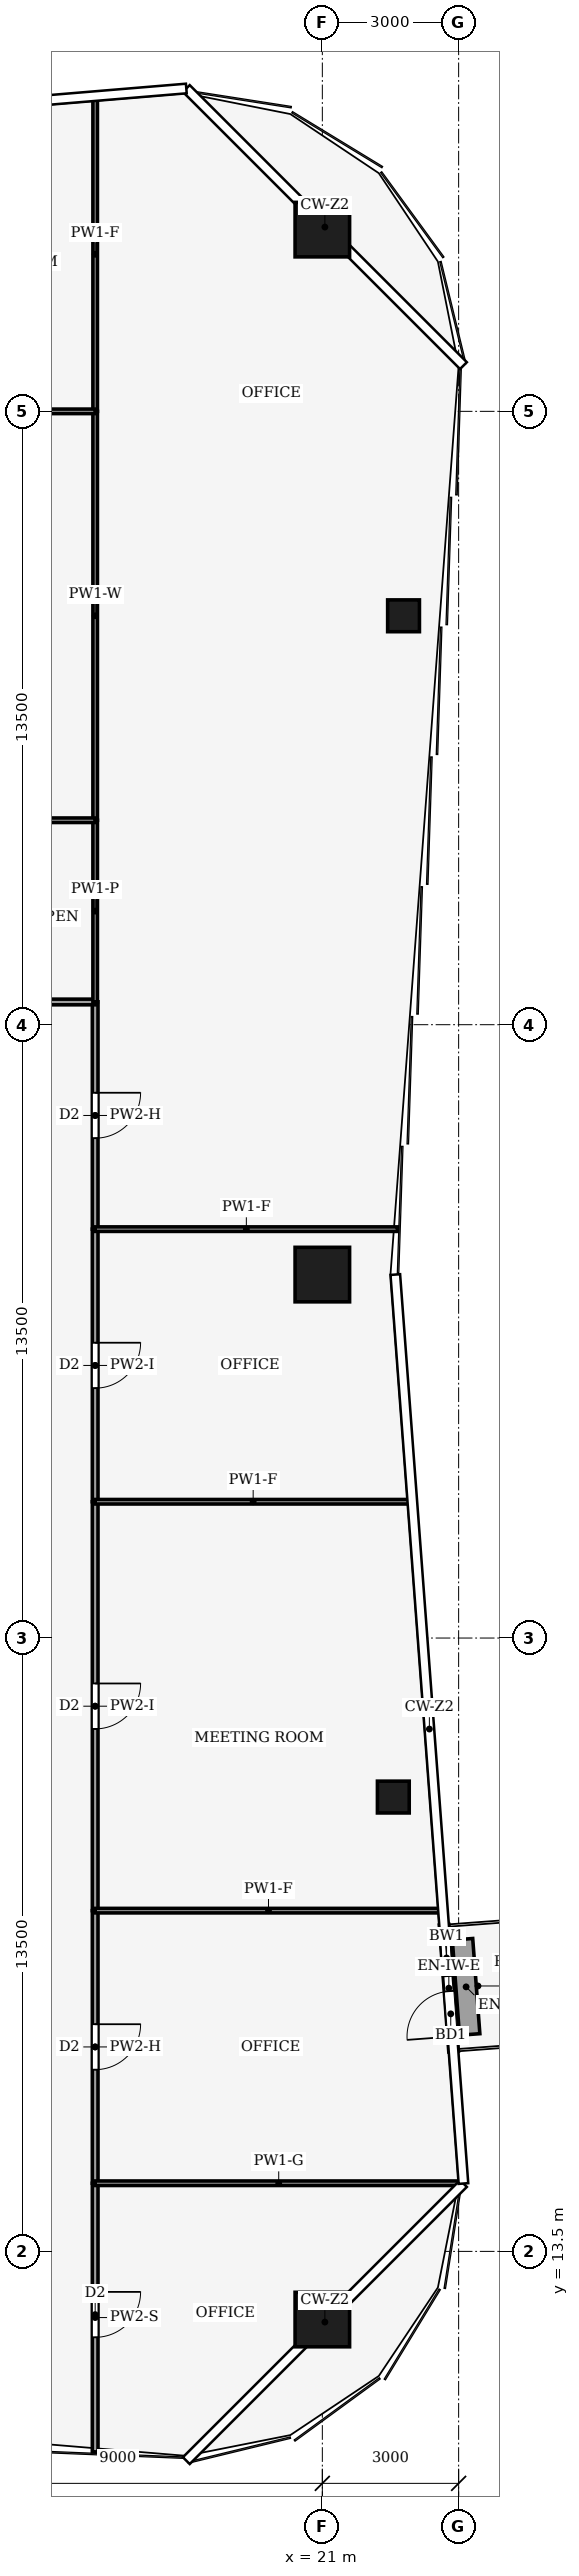
"""IFC4 building model, lengths in metres.
Left out: names, types, materials, properties, quantities, classifications, styles, units other than length and angle.
Written with IfcOpenShell. Run it as: python <this file> out.ifc"""

import sys

from ifc_helpers import new_model, si_unit, direction, frame, frame_2d, origin, origin_2d, place, context, subcontext, project, spatial, rectangle, hollow_rectangle, extrude, element, fill, save


model = new_model("IFC4")
c1 = context("Model", 3, precision=1e-05, world=origin(), true_north=direction((0.0, 1.0)))
c2 = subcontext(c1, "Body", "Model", "MODEL_VIEW")
j1 = project(units=[si_unit("LENGTHUNIT", "METRE"), si_unit("PLANEANGLEUNIT", "RADIAN")], contexts=[c1])
p1 = place(None, origin())
s1 = spatial("IfcSite", under=j1, at=p1, CompositionType="ELEMENT")
p2 = place(p1, origin())
s2 = spatial("IfcBuilding", under=s1, at=p2, CompositionType="ELEMENT")
p3 = place(p2, frame((0.0, 0.0, 130.0)))
s3 = spatial("IfcBuildingStorey", under=s2, at=p3, CompositionType="ELEMENT", Elevation=130.0)
for number, where, z_axis, x_axis in (
    (1, (21.0, 58.0, 0.0), (0.0, 0.0, 1.0), (1.0, 0.0, 0.0)),
    (2, (21.0, 35.0, 0.0), (0.0, 0.0, 1.0), (1.0, 0.0, 0.0)),
    (3, (21.0, 12.0, 0.0), (0.0, 0.0, 1.0), (1.0, 0.0, 0.0)),
):
    element("IfcColumn", number, at=place(p3, frame(where, z_axis=z_axis, x_axis=x_axis)), inside=s3, PredefinedType="COLUMN", context=c2, shape_type="SweptSolid", body=[
        extrude(hollow_rectangle(XDim=1.2, YDim=1.2, WallThickness=0.07, at=origin_2d()), origin(), (0.0, 0.0, 1.0), 4.0),
    ])
for number, where, z_axis, x_axis in (
    (4, (22.562, 23.5, 0.0), (0.0, 0.0, 1.0), (1.0, 0.0, 0.0)),
    (5, (22.788, 49.5, 0.0), (0.0, 0.0, 1.0), (1.0, 0.0, 0.0)),
):
    element("IfcColumn", number, at=place(p3, frame(where, z_axis=z_axis, x_axis=x_axis)), inside=s3, PredefinedType="COLUMN", context=c2, shape_type="SweptSolid", body=[
        extrude(hollow_rectangle(XDim=0.7, YDim=0.7, WallThickness=0.03, at=origin_2d()), origin(), (0.0, 0.0, 1.0), 4.0),
    ])
p4 = place(p3, frame((23.889, 17.897, 0.0), z_axis=(0.0, 0.0, 1.0), x_axis=(-0.07478344779, 0.997199797401, 0.0)))
e6 = element("IfcWall", 6, at=p4, inside=s3, PredefinedType="SOLIDWALL", context=c2, shape_type="SweptSolid", body=[
    extrude(rectangle(XDim=2.801, YDim=0.212, at=frame_2d((1.4, 0.0))), origin(), (0.0, 0.0, 1.0), 3.65),
])
p5 = place(p4, frame((0.334, 0.0, 0.0)))
e7 = element("IfcOpeningElement", 7, at=p5, cuts=e6, PredefinedType="OPENING", context=c2, shape_type="SweptSolid", body=[
    extrude(rectangle(XDim=1.0, YDim=2.1, at=frame_2d((0.5, 1.05))), frame((0.0, 0.116, 0.0), z_axis=(0.0, -1.0, 0.0), x_axis=(1.0, 0.0, 0.0)), (0.0, 0.0, 1.0), 0.232),
])
p6 = place(p4, frame((1.667, 0.0, 0.9)))
e8 = element("IfcOpeningElement", 8, at=p6, cuts=e6, PredefinedType="OPENING", context=c2, shape_type="SweptSolid", body=[
    extrude(rectangle(XDim=0.8, YDim=1.2, at=frame_2d((0.4, 0.6))), frame((0.0, 0.116, 0.0), z_axis=(0.0, -1.0, 0.0), x_axis=(1.0, 0.0, 0.0)), (0.0, 0.0, 1.0), 0.232),
])
p7 = place(p3, frame((24.243, 18.274, 0.0), z_axis=(0.0, 0.0, 1.0), x_axis=(-0.074706185882, 0.997205588528, 0.0)))
e9 = element("IfcWall", 9, at=p7, inside=s3, PredefinedType="USERDEFINED", context=c2, shape_type="SweptSolid", body=[
    extrude(rectangle(XDim=2.101, YDim=0.45, at=frame_2d((1.051, 0.0))), origin(), (0.0, 0.0, 1.0), 0.4),
])
p8 = place(p3, frame((16.0, 15.0, 0.0), z_axis=(0.0, 0.0, 1.0), x_axis=(0.0, -1.0, 0.0)))
e10 = element("IfcWall", 10, at=p8, inside=s3, PredefinedType="PARTITIONING", context=c2, shape_type="SweptSolid", body=[
    extrude(rectangle(XDim=5.913, YDim=0.125, at=frame_2d((2.957, 0.0))), origin(), (0.0, 0.0, 1.0), 3.04),
])
p9 = place(p8, frame((2.392, 0.0, 0.0)))
e11 = element("IfcOpeningElement", 11, at=p9, cuts=e10, PredefinedType="OPENING", context=c2, shape_type="SweptSolid", body=[
    extrude(rectangle(XDim=1.0, YDim=2.1, at=frame_2d((0.5, 1.05))), frame((0.0, 0.073, 0.0), z_axis=(0.0, -1.0, 0.0), x_axis=(1.0, 0.0, 0.0)), (0.0, 0.0, 1.0), 0.145),
])
p10 = place(p3, frame((16.0, 21.0, 0.0), z_axis=(0.0, 0.0, 1.0), x_axis=(0.0, -1.0, 0.0)))
e12 = element("IfcWall", 12, at=p10, inside=s3, PredefinedType="PARTITIONING", context=c2, shape_type="SweptSolid", body=[
    extrude(rectangle(XDim=6.0, YDim=0.125, at=frame_2d((3.0, 0.0))), origin(), (0.0, 0.0, 1.0), 3.14),
])
p11 = place(p10, frame((2.5, 0.0, 0.0)))
e13 = element("IfcOpeningElement", 13, at=p11, cuts=e12, PredefinedType="OPENING", context=c2, shape_type="SweptSolid", body=[
    extrude(rectangle(XDim=1.0, YDim=2.1, at=frame_2d((0.5, 1.05))), frame((0.0, 0.073, 0.0), z_axis=(0.0, -1.0, 0.0), x_axis=(1.0, 0.0, 0.0)), (0.0, 0.0, 1.0), 0.145),
])
p12 = place(p3, frame((16.0, 30.0, 0.0), z_axis=(0.0, 0.0, 1.0), x_axis=(0.0, -1.0, 0.0)))
e14 = element("IfcWall", 14, at=p12, inside=s3, PredefinedType="PARTITIONING", context=c2, shape_type="SweptSolid", body=[
    extrude(rectangle(XDim=9.0, YDim=0.125, at=frame_2d((4.5, 0.0))), origin(), (0.0, 0.0, 1.0), 3.48),
])
p13 = place(p12, frame((4.0, 0.0, 0.0)))
e15 = element("IfcOpeningElement", 15, at=p13, cuts=e14, PredefinedType="OPENING", context=c2, shape_type="SweptSolid", body=[
    extrude(rectangle(XDim=1.0, YDim=2.1, at=frame_2d((0.5, 1.05))), frame((0.0, 0.073, 0.0), z_axis=(0.0, -1.0, 0.0), x_axis=(1.0, 0.0, 0.0)), (0.0, 0.0, 1.0), 0.145),
])
p14 = place(p3, frame((16.0, 36.0, 0.0), z_axis=(0.0, 0.0, 1.0), x_axis=(0.0, -1.0, 0.0)))
e16 = element("IfcWall", 16, at=p14, inside=s3, PredefinedType="PARTITIONING", context=c2, shape_type="SweptSolid", body=[
    extrude(rectangle(XDim=6.0, YDim=0.125, at=frame_2d((3.0, 0.0))), origin(), (0.0, 0.0, 1.0), 3.48),
])
p15 = place(p14, frame((2.5, 0.0, 0.0)))
e17 = element("IfcOpeningElement", 17, at=p15, cuts=e16, PredefinedType="OPENING", context=c2, shape_type="SweptSolid", body=[
    extrude(rectangle(XDim=1.0, YDim=2.1, at=frame_2d((0.5, 1.05))), frame((0.0, 0.073, 0.0), z_axis=(0.0, -1.0, 0.0), x_axis=(1.0, 0.0, 0.0)), (0.0, 0.0, 1.0), 0.145),
])
p16 = place(p3, frame((16.0, 41.004, 0.0), z_axis=(0.0, 0.0, 1.0), x_axis=(0.0, -1.0, 0.0)))
e18 = element("IfcWall", 18, at=p16, inside=s3, PredefinedType="PARTITIONING", context=c2, shape_type="SweptSolid", body=[
    extrude(rectangle(XDim=5.004, YDim=0.125, at=frame_2d((2.502, 0.0))), origin(), (0.0, 0.0, 1.0), 3.14),
])
p17 = place(p16, frame((2.002, 0.0, 0.0)))
e19 = element("IfcOpeningElement", 19, at=p17, cuts=e18, PredefinedType="OPENING", context=c2, shape_type="SweptSolid", body=[
    extrude(rectangle(XDim=1.0, YDim=2.1, at=frame_2d((0.5, 1.05))), frame((0.0, 0.073, 0.0), z_axis=(0.0, -1.0, 0.0), x_axis=(1.0, 0.0, 0.0)), (0.0, 0.0, 1.0), 0.145),
])
p18 = place(p3, frame((12.0, 41.0, 0.0), z_axis=(0.0, 0.0, 1.0), x_axis=(1.0, 0.0, 0.0)))
e20 = element("IfcWall", 20, at=p18, inside=s3, PredefinedType="PARTITIONING", context=c2, shape_type="SweptSolid", body=[
    extrude(rectangle(XDim=4.0, YDim=0.125, at=frame_2d((2.0, 0.0))), origin(), (0.0, 0.0, 1.0), 3.44),
])
p19 = place(p18, frame((1.5, 0.0, 0.0)))
e21 = element("IfcOpeningElement", 21, at=p19, cuts=e20, PredefinedType="OPENING", context=c2, shape_type="SweptSolid", body=[
    extrude(rectangle(XDim=1.0, YDim=2.1, at=frame_2d((0.5, 1.05))), frame((0.0, 0.073, 0.0), z_axis=(0.0, -1.0, 0.0), x_axis=(1.0, 0.0, 0.0)), (0.0, 0.0, 1.0), 0.145),
])
p20 = place(p3, frame((24.08, 15.0, 0.0), z_axis=(0.0, 0.0, 1.0), x_axis=(-1.0, 0.0, 0.0)))
e22 = element("IfcWall", 22, at=p20, inside=s3, PredefinedType="PARTITIONING", context=c2, shape_type="SweptSolid", body=[
    extrude(rectangle(XDim=8.08, YDim=0.1, at=frame_2d((4.04, 0.0))), origin(), (0.0, 0.0, 1.0), 2.93),
])
p21 = place(p3, frame((23.63, 21.0, 0.0), z_axis=(0.0, 0.0, 1.0), x_axis=(-1.0, 0.0, 0.0)))
e23 = element("IfcWall", 23, at=p21, inside=s3, PredefinedType="PARTITIONING", context=c2, shape_type="SweptSolid", body=[
    extrude(rectangle(XDim=7.63, YDim=0.1, at=frame_2d((3.815, 0.0))), origin(), (0.0, 0.0, 1.0), 3.04),
])
p22 = place(p3, frame((22.955, 30.0, 0.0), z_axis=(0.0, 0.0, 1.0), x_axis=(-1.0, 0.0, 0.0)))
e24 = element("IfcWall", 24, at=p22, inside=s3, PredefinedType="PARTITIONING", context=c2, shape_type="SweptSolid", body=[
    extrude(rectangle(XDim=6.955, YDim=0.1, at=frame_2d((3.478, 0.0))), origin(), (0.0, 0.0, 1.0), 3.04),
])
p23 = place(p3, frame((22.655, 36.0, 0.0), z_axis=(0.0, 0.0, 1.0), x_axis=(-1.0, 0.0, 0.0)))
e25 = element("IfcWall", 25, at=p23, inside=s3, PredefinedType="PARTITIONING", context=c2, shape_type="SweptSolid", body=[
    extrude(rectangle(XDim=6.655, YDim=0.1, at=frame_2d((3.328, 0.0))), origin(), (0.0, 0.0, 1.0), 3.04),
])
p24 = place(p3, frame((16.0, 45.0, 0.0), z_axis=(0.0, 0.0, 1.0), x_axis=(0.0, -1.0, 0.0)))
e26 = element("IfcWall", 26, at=p24, inside=s3, PredefinedType="PARTITIONING", context=c2, shape_type="SweptSolid", body=[
    extrude(rectangle(XDim=4.0, YDim=0.1, at=frame_2d((2.0, 0.0))), origin(), (0.0, 0.0, 1.0), 3.44),
])
p25 = place(p3, frame((16.0, 54.0, 0.0), z_axis=(0.0, 0.0, 1.0), x_axis=(0.0, -1.0, 0.0)))
e27 = element("IfcWall", 27, at=p25, inside=s3, PredefinedType="PARTITIONING", context=c2, shape_type="SweptSolid", body=[
    extrude(rectangle(XDim=9.0, YDim=0.1, at=frame_2d((4.5, 0.0))), origin(), (0.0, 0.0, 1.0), 3.24),
])
p26 = place(p3, frame((16.0, 60.913, 0.0), z_axis=(0.0, 0.0, 1.0), x_axis=(0.0, -1.0, 0.0)))
e28 = element("IfcWall", 28, at=p26, inside=s3, PredefinedType="PARTITIONING", context=c2, shape_type="SweptSolid", body=[
    extrude(rectangle(XDim=6.913, YDim=0.1, at=frame_2d((3.457, 0.0))), origin(), (0.0, 0.0, 1.0), 3.04),
])
p27 = place(p3, frame((16.0, 45.0, 0.0), z_axis=(0.0, 0.0, 1.0), x_axis=(-1.0, 0.0, 0.0)))
e29 = element("IfcWall", 29, at=p27, inside=s3, PredefinedType="PARTITIONING", context=c2, shape_type="SweptSolid", body=[
    extrude(rectangle(XDim=4.004, YDim=0.1, at=frame_2d((2.002, 0.0))), origin(), (0.0, 0.0, 1.0), 3.87),
])
p28 = place(p3, frame((3.0, 54.0, 0.0), z_axis=(0.0, 0.0, 1.0), x_axis=(1.0, 0.0, 0.0)))
e30 = element("IfcWall", 30, at=p28, inside=s3, PredefinedType="PARTITIONING", context=c2, shape_type="SweptSolid", body=[
    extrude(rectangle(XDim=13.0, YDim=0.1, at=frame_2d((6.5, 0.0))), origin(), (0.0, 0.0, 1.0), 3.44),
])
p29 = place(p28, frame((6.0, 0.0, 0.0)))
e31 = element("IfcOpeningElement", 31, at=p29, cuts=e30, PredefinedType="OPENING", context=c2, shape_type="SweptSolid", body=[
    extrude(rectangle(XDim=1.0, YDim=2.1, at=frame_2d((0.5, 1.05))), frame((0.0, 0.06, 0.0), z_axis=(0.0, -1.0, 0.0), x_axis=(1.0, 0.0, 0.0)), (0.0, 0.0, 1.0), 0.12),
])
p30 = place(p5, origin())
e32 = element("IfcDoor", 32, at=p30, inside=s3, OperationType="SINGLE_SWING_LEFT", PredefinedType="DOOR", context=c2, shape_type="SweptSolid", body=[
    extrude(rectangle(XDim=1.0, YDim=2.1, at=frame_2d((0.5, 1.05))), frame((0.0, 0.025, 0.0), z_axis=(0.0, -1.0, 0.0), x_axis=(1.0, 0.0, 0.0)), (0.0, 0.0, 1.0), 0.05),
])
fill(e7, e32)
p31 = place(p6, origin())
e33 = element("IfcWindow", 33, at=p31, inside=s3, PartitioningType="SINGLE_PANEL", PredefinedType="WINDOW", context=c2, shape_type="SweptSolid", body=[
    extrude(rectangle(XDim=0.8, YDim=1.2, at=frame_2d((0.4, 0.6))), frame((0.0, 0.03, 0.0), z_axis=(0.0, -1.0, 0.0), x_axis=(1.0, 0.0, 0.0)), (0.0, 0.0, 1.0), 0.06),
])
fill(e8, e33)
p32 = place(p9, origin())
e34 = element("IfcDoor", 34, at=p32, inside=s3, OperationType="SINGLE_SWING_LEFT", PredefinedType="DOOR", context=c2, shape_type="SweptSolid", body=[
    extrude(rectangle(XDim=1.0, YDim=2.1, at=frame_2d((0.5, 1.05))), frame((0.0, 0.025, 0.0), z_axis=(0.0, -1.0, 0.0), x_axis=(1.0, 0.0, 0.0)), (0.0, 0.0, 1.0), 0.05),
])
fill(e11, e34)
p33 = place(p11, origin())
e35 = element("IfcDoor", 35, at=p33, inside=s3, OperationType="SINGLE_SWING_RIGHT", PredefinedType="DOOR", context=c2, shape_type="SweptSolid", body=[
    extrude(rectangle(XDim=1.0, YDim=2.1, at=frame_2d((0.5, 1.05))), frame((0.0, 0.025, 0.0), z_axis=(0.0, -1.0, 0.0), x_axis=(1.0, 0.0, 0.0)), (0.0, 0.0, 1.0), 0.05),
])
fill(e13, e35)
p34 = place(p13, origin())
e36 = element("IfcDoor", 36, at=p34, inside=s3, OperationType="SINGLE_SWING_LEFT", PredefinedType="DOOR", context=c2, shape_type="SweptSolid", body=[
    extrude(rectangle(XDim=1.0, YDim=2.1, at=frame_2d((0.5, 1.05))), frame((0.0, 0.025, 0.0), z_axis=(0.0, -1.0, 0.0), x_axis=(1.0, 0.0, 0.0)), (0.0, 0.0, 1.0), 0.05),
])
fill(e15, e36)
p35 = place(p15, origin())
e37 = element("IfcDoor", 37, at=p35, inside=s3, OperationType="SINGLE_SWING_RIGHT", PredefinedType="DOOR", context=c2, shape_type="SweptSolid", body=[
    extrude(rectangle(XDim=1.0, YDim=2.1, at=frame_2d((0.5, 1.05))), frame((0.0, 0.025, 0.0), z_axis=(0.0, -1.0, 0.0), x_axis=(1.0, 0.0, 0.0)), (0.0, 0.0, 1.0), 0.05),
])
fill(e17, e37)
p36 = place(p17, origin())
e38 = element("IfcDoor", 38, at=p36, inside=s3, OperationType="SINGLE_SWING_LEFT", PredefinedType="DOOR", context=c2, shape_type="SweptSolid", body=[
    extrude(rectangle(XDim=1.0, YDim=2.1, at=frame_2d((0.5, 1.05))), frame((0.0, 0.025, 0.0), z_axis=(0.0, -1.0, 0.0), x_axis=(1.0, 0.0, 0.0)), (0.0, 0.0, 1.0), 0.05),
])
fill(e19, e38)
save(model, sys.argv[1])
